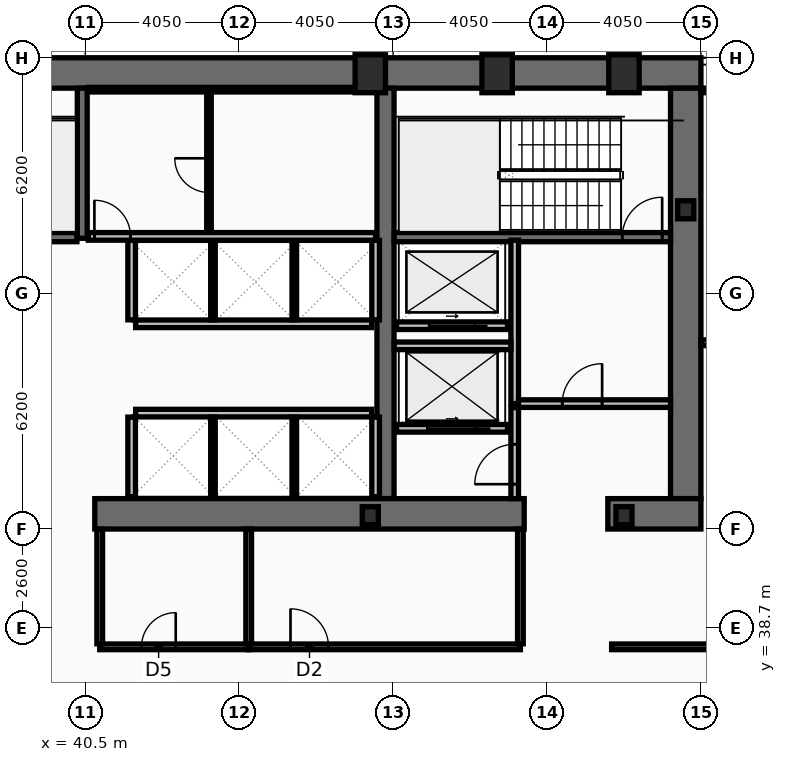
"""IFC4 building model, lengths in metres.
Left out: names, types, materials, properties, quantities, classifications, styles, units other than length and angle.
Written with IfcOpenShell. Run it as: python <this file> out.ifc"""

import sys

from ifc_helpers import new_model, si_unit, direction, frame, frame_2d, origin, origin_2d, place, context, subcontext, project, spatial, rectangle, hollow_rectangle, i_section, extrude, element, fill, save


model = new_model("IFC4")
c1 = context("Model", 3, precision=1e-05, world=origin(), true_north=direction((0.0, 1.0)))
c2 = subcontext(c1, "Body", "Model", "MODEL_VIEW")
j1 = project(units=[si_unit("LENGTHUNIT", "METRE"), si_unit("PLANEANGLEUNIT", "RADIAN")], contexts=[c1])
p1 = place(None, origin())
s1 = spatial("IfcSite", under=j1, at=p1, CompositionType="ELEMENT")
p2 = place(p1, origin())
s2 = spatial("IfcBuilding", under=s1, at=p2, CompositionType="ELEMENT")
p3 = place(p2, frame((0.0, 0.0, 73.8)))
s3 = spatial("IfcBuildingStorey", under=s2, at=p3, CompositionType="ELEMENT", Elevation=73.8)
p4 = place(p3, frame((16.2, 53.3, 0.0), z_axis=(0.0, 0.0, 1.0), x_axis=(1.0, 0.0, 0.0)))
e1 = element("IfcWall", 1, at=p4, inside=s3, PredefinedType="SHEAR", context=c2, shape_type="SweptSolid", body=[
    extrude(rectangle(XDim=40.5, YDim=0.8, at=frame_2d((20.25, 0.0))), origin(), (0.0, 0.0, 1.0), 3.82),
])
p5 = place(p3, frame((56.3, 52.9, 0.0), z_axis=(0.0, 0.0, 1.0), x_axis=(0.0, -1.0, 0.0)))
e2 = element("IfcWall", 2, at=p5, inside=s3, PredefinedType="SHEAR", context=c2, shape_type="SweptSolid", body=[
    extrude(rectangle(XDim=10.8, YDim=0.8, at=frame_2d((5.4, 0.0))), origin(), (0.0, 0.0, 1.0), 3.82),
])
p6 = place(p3, frame((48.4, 42.1, 0.0), z_axis=(0.0, 0.0, 1.0), x_axis=(0.0, 1.0, 0.0)))
e3 = element("IfcWall", 3, at=p6, inside=s3, PredefinedType="SHEAR", context=c2, shape_type="SweptSolid", body=[
    extrude(rectangle(XDim=10.8, YDim=0.45, at=frame_2d((5.4, 0.0))), origin(), (0.0, 0.0, 1.0), 3.82),
])
p7 = place(p3, frame((52.05, 41.7, 0.0), z_axis=(0.0, 0.0, 1.0), x_axis=(-1.0, 0.0, 0.0)))
e4 = element("IfcWall", 4, at=p7, inside=s3, PredefinedType="SHEAR", context=c2, shape_type="SweptSolid", body=[
    extrude(rectangle(XDim=11.3, YDim=0.8, at=frame_2d((5.65, 0.0))), origin(), (0.0, 0.0, 1.0), 3.82),
])
p8 = place(p3, frame((56.7, 41.7, 0.0), z_axis=(0.0, 0.0, 1.0), x_axis=(-1.0, 0.0, 0.0)))
e5 = element("IfcWall", 5, at=p8, inside=s3, PredefinedType="SHEAR", context=c2, shape_type="SweptSolid", body=[
    extrude(rectangle(XDim=2.45, YDim=0.8, at=frame_2d((1.225, 0.0))), origin(), (0.0, 0.0, 1.0), 3.82),
])
p9 = place(p3, frame((40.42, 48.95, 0.0), z_axis=(0.0, 0.0, 1.0), x_axis=(0.0, 1.0, 0.0)))
e6 = element("IfcWall", 6, at=p9, inside=s3, PredefinedType="SHEAR", context=c2, shape_type="SweptSolid", body=[
    extrude(rectangle(XDim=3.95, YDim=0.26, at=frame_2d((1.975, 0.0))), origin(), (0.0, 0.0, 1.0), 3.82),
])
p10 = place(p3, frame((48.63, 48.98, 0.0), z_axis=(0.0, 0.0, 1.0), x_axis=(1.0, 0.0, 0.0)))
e7 = element("IfcWall", 7, at=p10, inside=s3, PredefinedType="SHEAR", context=c2, shape_type="SweptSolid", body=[
    extrude(rectangle(XDim=7.27, YDim=0.24, at=frame_2d((3.635, 0.0))), origin(), (0.0, 0.0, 1.0), 3.82),
])
p11 = place(p10, frame((6.0, 0.0, 0.0)))
e8 = element("IfcOpeningElement", 8, at=p11, cuts=e7, PredefinedType="OPENING", context=c2, shape_type="SweptSolid", body=[
    extrude(rectangle(XDim=1.05, YDim=2.15, at=frame_2d((0.525, 1.075))), frame((0.0, 0.13, 0.0), z_axis=(0.0, -1.0, 0.0), x_axis=(1.0, 0.0, 0.0)), (0.0, 0.0, 1.0), 0.26),
])
p12 = place(p3, frame((32.72, 48.98, 0.0), z_axis=(0.0, 0.0, 1.0), x_axis=(1.0, 0.0, 0.0)))
e9 = element("IfcWall", 9, at=p12, inside=s3, PredefinedType="SHEAR", context=c2, shape_type="SweptSolid", body=[
    extrude(rectangle(XDim=7.56, YDim=0.24, at=frame_2d((3.78, 0.0))), origin(), (0.0, 0.0, 1.0), 3.82),
])
p13 = place(p12, frame((0.22, 0.0, 0.0)))
e10 = element("IfcOpeningElement", 10, at=p13, cuts=e9, PredefinedType="OPENING", context=c2, shape_type="SweptSolid", body=[
    extrude(rectangle(XDim=1.05, YDim=2.15, at=frame_2d((0.525, 1.075))), frame((0.0, 0.13, 0.0), z_axis=(0.0, -1.0, 0.0), x_axis=(1.0, 0.0, 0.0)), (0.0, 0.0, 1.0), 0.26),
])
for number, where, z_axis, x_axis in (
    (11, (48.0, 53.28, 0.0), (0.0, 0.0, 1.0), (1.0, 0.0, 0.0)),
    (12, (51.337, 53.28, 0.0), (0.0, 0.0, 1.0), (1.0, 0.0, 0.0)),
    (13, (54.675, 53.28, 0.0), (0.0, 0.0, 1.0), (1.0, 0.0, 0.0)),
):
    element("IfcColumn", number, at=place(p3, frame(where, z_axis=z_axis, x_axis=x_axis)), inside=s3, PredefinedType="COLUMN", context=c2, shape_type="SweptSolid", body=[
        extrude(hollow_rectangle(XDim=0.8, YDim=1.0, WallThickness=0.055, at=origin_2d()), origin(), (0.0, 0.0, 1.0), 4.0),
    ])
for number, where, z_axis, x_axis in (
    (14, (56.3, 49.7, 0.0), (0.0, 0.0, 1.0), (1.0, 0.0, 0.0)),
    (15, (48.0, 41.65, 0.0), (0.0, 0.0, 1.0), (1.0, 0.0, 0.0)),
    (16, (54.675, 41.65, 0.0), (0.0, 0.0, 1.0), (1.0, 0.0, 0.0)),
):
    element("IfcColumn", number, at=place(p3, frame(where, z_axis=z_axis, x_axis=x_axis)), inside=s3, PredefinedType="COLUMN", context=c2, shape_type="SweptSolid", body=[
        extrude(i_section(OverallWidth=0.424, OverallDepth=0.474, WebThickness=0.048, FlangeThickness=0.077, at=origin_2d()), origin(), (0.0, 0.0, 1.0), 4.0),
    ])
p14 = place(p3, frame((51.61, 43.95, 0.0), z_axis=(0.0, 0.0, 1.0), x_axis=(-1.0, 0.0, 0.0)))
e17 = element("IfcWall", 17, at=p14, inside=s3, PredefinedType="PARTITIONING", context=c2, shape_type="SweptSolid", body=[
    extrude(rectangle(XDim=2.92, YDim=0.2, at=frame_2d((1.46, 0.0))), origin(), (0.0, 0.0, 1.0), 3.82),
])
p15 = place(p14, frame((0.81, 0.0, 0.0)))
e18 = element("IfcOpeningElement", 18, at=p15, cuts=e17, PredefinedType="OPENING", context=c2, shape_type="SweptSolid", body=[
    extrude(rectangle(XDim=1.3, YDim=2.18, at=frame_2d((0.65, 1.09))), frame((0.0, 0.11, 0.0), z_axis=(0.0, -1.0, 0.0), x_axis=(1.0, 0.0, 0.0)), (0.0, 0.0, 1.0), 0.22),
])
p16 = place(p3, frame((51.61, 46.65, 0.0), z_axis=(0.0, 0.0, 1.0), x_axis=(-1.0, 0.0, 0.0)))
e19 = element("IfcWall", 19, at=p16, inside=s3, PredefinedType="PARTITIONING", context=c2, shape_type="SweptSolid", body=[
    extrude(rectangle(XDim=2.92, YDim=0.2, at=frame_2d((1.46, 0.0))), origin(), (0.0, 0.0, 1.0), 3.82),
])
p17 = place(p16, frame((0.86, 0.0, 0.0)))
e20 = element("IfcOpeningElement", 20, at=p17, cuts=e19, PredefinedType="OPENING", context=c2, shape_type="SweptSolid", body=[
    extrude(rectangle(XDim=1.2, YDim=2.18, at=frame_2d((0.6, 1.09))), frame((0.0, 0.11, 0.0), z_axis=(0.0, -1.0, 0.0), x_axis=(1.0, 0.0, 0.0)), (0.0, 0.0, 1.0), 0.22),
])
p18 = place(p3, frame((51.8, 44.6, 0.0), z_axis=(0.0, 0.0, 1.0), x_axis=(0.0, 1.0, 0.0)))
e21 = element("IfcWall", 21, at=p18, inside=s3, PredefinedType="PARTITIONING", context=c2, shape_type="SweptSolid", body=[
    extrude(rectangle(XDim=4.3, YDim=0.2, at=frame_2d((2.15, 0.0))), origin(), (0.0, 0.0, 1.0), 3.82),
])
p19 = place(p3, frame((51.9, 44.6, 0.0), z_axis=(0.0, 0.0, 1.0), x_axis=(1.0, 0.0, 0.0)))
e22 = element("IfcWall", 22, at=p19, inside=s3, PredefinedType="PARTITIONING", context=c2, shape_type="SweptSolid", body=[
    extrude(rectangle(XDim=4.0, YDim=0.2, at=frame_2d((2.0, 0.0))), origin(), (0.0, 0.0, 1.0), 3.82),
])
p20 = place(p19, frame((1.15, 0.0, 0.0)))
e23 = element("IfcOpeningElement", 23, at=p20, cuts=e22, PredefinedType="OPENING", context=c2, shape_type="SweptSolid", body=[
    extrude(rectangle(XDim=1.05, YDim=2.15, at=frame_2d((0.525, 1.075))), frame((0.0, 0.11, 0.0), z_axis=(0.0, -1.0, 0.0), x_axis=(1.0, 0.0, 0.0)), (0.0, 0.0, 1.0), 0.22),
])
p21 = place(p3, frame((48.63, 46.12, 0.0), z_axis=(0.0, 0.0, 1.0), x_axis=(1.0, 0.0, 0.0)))
e24 = element("IfcWall", 24, at=p21, inside=s3, PredefinedType="PARTITIONING", context=c2, shape_type="SweptSolid", body=[
    extrude(rectangle(XDim=3.07, YDim=0.2, at=frame_2d((1.535, 0.0))), origin(), (0.0, 0.0, 1.0), 3.82),
])
p22 = place(p3, frame((51.8, 42.1, 0.0), z_axis=(0.0, 0.0, 1.0), x_axis=(0.0, 1.0, 0.0)))
e25 = element("IfcWall", 25, at=p22, inside=s3, PredefinedType="PARTITIONING", context=c2, shape_type="SweptSolid", body=[
    extrude(rectangle(XDim=2.395, YDim=0.2, at=frame_2d((1.198, 0.0))), origin(), (0.0, 0.0, 1.0), 3.82),
])
p23 = place(p22, frame((0.38, 0.0, 0.0)))
e26 = element("IfcOpeningElement", 26, at=p23, cuts=e25, PredefinedType="OPENING", context=c2, shape_type="SweptSolid", body=[
    extrude(rectangle(XDim=1.05, YDim=2.15, at=frame_2d((0.525, 1.075))), frame((0.0, 0.11, 0.0), z_axis=(0.0, -1.0, 0.0), x_axis=(1.0, 0.0, 0.0)), (0.0, 0.0, 1.0), 0.22),
])
p24 = place(p3, frame((41.825, 46.7, 0.0), z_axis=(0.0, 0.0, 1.0), x_axis=(1.0, 0.0, 0.0)))
e27 = element("IfcWall", 27, at=p24, inside=s3, PredefinedType="PARTITIONING", context=c2, shape_type="SweptSolid", body=[
    extrude(rectangle(XDim=6.21, YDim=0.2, at=frame_2d((3.105, 0.0))), origin(), (0.0, 0.0, 1.0), 3.82),
])
for number, where, z_axis, x_axis in (
    (28, (41.72, 46.805, 0.0), (0.0, 0.0, 1.0), (0.0, 1.0, 0.0)),
    (29, (48.14, 46.805, 0.0), (0.0, 0.0, 1.0), (0.0, 1.0, 0.0)),
):
    element("IfcWall", number, at=place(p3, frame(where, z_axis=z_axis, x_axis=x_axis)), inside=s3, PredefinedType="PARTITIONING", context=c2, shape_type="SweptSolid", body=[
        extrude(rectangle(XDim=2.09, YDim=0.2, at=frame_2d((1.045, 0.0))), origin(), (0.0, 0.0, 1.0), 3.82),
    ])
for number, where, z_axis, x_axis in (
    (30, (43.86, 46.805, 0.0), (0.0, 0.0, 1.0), (0.0, 1.0, 0.0)),
    (31, (46.0, 46.805, 0.0), (0.0, 0.0, 1.0), (0.0, 1.0, 0.0)),
):
    element("IfcWall", number, at=place(p3, frame(where, z_axis=z_axis, x_axis=x_axis)), inside=s3, PredefinedType="PARTITIONING", context=c2, shape_type="SweptSolid", body=[
        extrude(rectangle(XDim=2.09, YDim=0.12, at=frame_2d((1.045, 0.0))), origin(), (0.0, 0.0, 1.0), 3.82),
    ])
p25 = place(p3, frame((41.825, 44.35, 0.0), z_axis=(0.0, 0.0, 1.0), x_axis=(1.0, 0.0, 0.0)))
e32 = element("IfcWall", 32, at=p25, inside=s3, PredefinedType="PARTITIONING", context=c2, shape_type="SweptSolid", body=[
    extrude(rectangle(XDim=6.21, YDim=0.2, at=frame_2d((3.105, 0.0))), origin(), (0.0, 0.0, 1.0), 3.82),
])
for number, where, z_axis, x_axis in (
    (33, (41.72, 42.15, 0.0), (0.0, 0.0, 1.0), (0.0, 1.0, 0.0)),
    (34, (48.14, 42.15, 0.0), (0.0, 0.0, 1.0), (0.0, 1.0, 0.0)),
):
    element("IfcWall", number, at=place(p3, frame(where, z_axis=z_axis, x_axis=x_axis)), inside=s3, PredefinedType="PARTITIONING", context=c2, shape_type="SweptSolid", body=[
        extrude(rectangle(XDim=2.095, YDim=0.2, at=frame_2d((1.048, 0.0))), origin(), (0.0, 0.0, 1.0), 3.82),
    ])
for number, where, z_axis, x_axis in (
    (35, (43.86, 42.15, 0.0), (0.0, 0.0, 1.0), (0.0, 1.0, 0.0)),
    (36, (46.0, 42.15, 0.0), (0.0, 0.0, 1.0), (0.0, 1.0, 0.0)),
):
    element("IfcWall", number, at=place(p3, frame(where, z_axis=z_axis, x_axis=x_axis)), inside=s3, PredefinedType="PARTITIONING", context=c2, shape_type="SweptSolid", body=[
        extrude(rectangle(XDim=2.095, YDim=0.12, at=frame_2d((1.048, 0.0))), origin(), (0.0, 0.0, 1.0), 3.82),
    ])
p26 = place(p3, frame((40.58, 52.86, 0.0), z_axis=(0.0, 0.0, 1.0), x_axis=(1.0, 0.0, 0.0)))
e37 = element("IfcWall", 37, at=p26, inside=s3, PredefinedType="PARTITIONING", context=c2, shape_type="SweptSolid", body=[
    extrude(rectangle(XDim=7.56, YDim=0.12, at=frame_2d((3.78, 0.0))), origin(), (0.0, 0.0, 1.0), 3.82),
])
p27 = place(p3, frame((40.58, 49.0, 0.0), z_axis=(0.0, 0.0, 1.0), x_axis=(1.0, 0.0, 0.0)))
e38 = element("IfcWall", 38, at=p27, inside=s3, PredefinedType="PARTITIONING", context=c2, shape_type="SweptSolid", body=[
    extrude(rectangle(XDim=7.56, YDim=0.2, at=frame_2d((3.78, 0.0))), origin(), (0.0, 0.0, 1.0), 3.82),
])
p28 = place(p27, frame((0.16, 0.0, 0.0)))
e39 = element("IfcOpeningElement", 39, at=p28, cuts=e38, PredefinedType="OPENING", context=c2, shape_type="SweptSolid", body=[
    extrude(rectangle(XDim=0.95, YDim=2.1, at=frame_2d((0.475, 1.05))), frame((0.0, 0.11, 0.0), z_axis=(0.0, -1.0, 0.0), x_axis=(1.0, 0.0, 0.0)), (0.0, 0.0, 1.0), 0.22),
])
p29 = place(p3, frame((43.755, 49.105, 0.0), z_axis=(0.0, 0.0, 1.0), x_axis=(0.0, 1.0, 0.0)))
e40 = element("IfcWall", 40, at=p29, inside=s3, PredefinedType="PARTITIONING", context=c2, shape_type="SweptSolid", body=[
    extrude(rectangle(XDim=3.69, YDim=0.12, at=frame_2d((1.845, 0.0))), origin(), (0.0, 0.0, 1.0), 3.82),
])
p30 = place(p29, frame((1.05, 0.0, 0.0)))
e41 = element("IfcOpeningElement", 41, at=p30, cuts=e40, PredefinedType="OPENING", context=c2, shape_type="SweptSolid", body=[
    extrude(rectangle(XDim=0.9, YDim=2.05, at=frame_2d((0.45, 1.025))), frame((0.0, 0.07, 0.0), z_axis=(0.0, -1.0, 0.0), x_axis=(1.0, 0.0, 0.0)), (0.0, 0.0, 1.0), 0.14),
])
p31 = place(p3, frame((40.88, 38.2, 0.0), z_axis=(0.0, 0.0, 1.0), x_axis=(1.0, 0.0, 0.0)))
e42 = element("IfcWall", 42, at=p31, inside=s3, PredefinedType="PARTITIONING", context=c2, shape_type="SweptSolid", body=[
    extrude(rectangle(XDim=3.92, YDim=0.15, at=frame_2d((1.96, 0.0))), origin(), (0.0, 0.0, 1.0), 3.01),
])
p32 = place(p31, frame((1.1, 0.0, 0.0)))
e43 = element("IfcOpeningElement", 43, at=p32, cuts=e42, PredefinedType="OPENING", context=c2, shape_type="SweptSolid", body=[
    extrude(rectangle(XDim=0.9, YDim=2.05, at=frame_2d((0.45, 1.025))), frame((0.0, 0.085, 0.0), z_axis=(0.0, -1.0, 0.0), x_axis=(1.0, 0.0, 0.0)), (0.0, 0.0, 1.0), 0.17),
])
p33 = place(p3, frame((44.8, 38.2, 0.0), z_axis=(0.0, 0.0, 1.0), x_axis=(1.0, 0.0, 0.0)))
e44 = element("IfcWall", 44, at=p33, inside=s3, PredefinedType="PARTITIONING", context=c2, shape_type="SweptSolid", body=[
    extrude(rectangle(XDim=7.15, YDim=0.15, at=frame_2d((3.575, 0.0))), origin(), (0.0, 0.0, 1.0), 3.01),
])
p34 = place(p33, frame((1.1, 0.0, 0.0)))
e45 = element("IfcOpeningElement", 45, at=p34, cuts=e44, PredefinedType="OPENING", context=c2, shape_type="SweptSolid", body=[
    extrude(rectangle(XDim=1.0, YDim=2.05, at=frame_2d((0.5, 1.025))), frame((0.0, 0.085, 0.0), z_axis=(0.0, -1.0, 0.0), x_axis=(1.0, 0.0, 0.0)), (0.0, 0.0, 1.0), 0.17),
])
for number, where, z_axis, x_axis in (
    (46, (40.88, 38.28, 0.0), (0.0, 0.0, 1.0), (0.0, 1.0, 0.0)),
    (47, (44.8, 38.28, 0.0), (0.0, 0.0, 1.0), (0.0, 1.0, 0.0)),
    (48, (51.95, 38.28, 0.0), (0.0, 0.0, 1.0), (0.0, 1.0, 0.0)),
):
    element("IfcWall", number, at=place(p3, frame(where, z_axis=z_axis, x_axis=x_axis)), inside=s3, PredefinedType="PARTITIONING", context=c2, shape_type="SweptSolid", body=[
        extrude(rectangle(XDim=3.02, YDim=0.15, at=frame_2d((1.51, 0.0))), origin(), (0.0, 0.0, 1.0), 3.82),
    ])
p35 = place(p3, frame((54.35, 38.2, 0.0), z_axis=(0.0, 0.0, 1.0), x_axis=(1.0, 0.0, 0.0)))
e49 = element("IfcWall", 49, at=p35, inside=s3, PredefinedType="PARTITIONING", context=c2, shape_type="SweptSolid", body=[
    extrude(rectangle(XDim=16.52, YDim=0.15, at=frame_2d((8.26, 0.0))), origin(), (0.0, 0.0, 1.0), 3.01),
])
p36 = place(p35, frame((3.25, 0.0, 0.0)))
e50 = element("IfcOpeningElement", 50, at=p36, cuts=e49, PredefinedType="OPENING", context=c2, shape_type="SweptSolid", body=[
    extrude(rectangle(XDim=0.95, YDim=2.05, at=frame_2d((0.475, 1.025))), frame((0.0, 0.085, 0.0), z_axis=(0.0, -1.0, 0.0), x_axis=(1.0, 0.0, 0.0)), (0.0, 0.0, 1.0), 0.17),
])
p37 = place(p3, frame((56.7, 46.2, 0.0), z_axis=(0.0, 0.0, 1.0), x_axis=(1.0, 0.0, 0.0)))
e51 = element("IfcWall", 51, at=p37, inside=s3, PredefinedType="PARTITIONING", context=c2, shape_type="SweptSolid", body=[
    extrude(rectangle(XDim=14.105, YDim=0.15, at=frame_2d((7.052, 0.0))), origin(), (0.0, 0.0, 1.0), 3.16),
])
p38 = place(p37, frame((0.9, 0.0, 0.0)))
e52 = element("IfcOpeningElement", 52, at=p38, cuts=e51, PredefinedType="OPENING", context=c2, shape_type="SweptSolid", body=[
    extrude(rectangle(XDim=0.9, YDim=2.05, at=frame_2d((0.45, 1.025))), frame((0.0, 0.085, 0.0), z_axis=(0.0, -1.0, 0.0), x_axis=(1.0, 0.0, 0.0)), (0.0, 0.0, 1.0), 0.17),
])
p39 = place(p3, frame((56.7, 52.84, 0.0), z_axis=(0.0, 0.0, 1.0), x_axis=(1.0, 0.0, 0.0)))
e53 = element("IfcWall", 53, at=p39, inside=s3, PredefinedType="PARTITIONING", context=c2, shape_type="SweptSolid", body=[
    extrude(rectangle(XDim=14.105, YDim=0.12, at=frame_2d((7.052, 0.0))), origin(), (0.0, 0.0, 1.0), 3.82),
])
p40 = place(p11, origin())
e54 = element("IfcDoor", 54, at=p40, inside=s3, OperationType="SINGLE_SWING_RIGHT", PredefinedType="DOOR", context=c2, shape_type="SweptSolid", body=[
    extrude(rectangle(XDim=1.05, YDim=2.15, at=frame_2d((0.525, 1.075))), frame((0.0, 0.025, 0.0), z_axis=(0.0, -1.0, 0.0), x_axis=(1.0, 0.0, 0.0)), (0.0, 0.0, 1.0), 0.05),
])
fill(e8, e54)
p41 = place(p15, origin())
e55 = element("IfcDoor", 55, at=p41, inside=s3, OperationType="SLIDING_TO_LEFT", PredefinedType="DOOR", context=c2, shape_type="SweptSolid", body=[
    extrude(rectangle(XDim=1.3, YDim=2.18, at=frame_2d((0.65, 1.09))), frame((0.0, 0.025, 0.0), z_axis=(0.0, -1.0, 0.0), x_axis=(1.0, 0.0, 0.0)), (0.0, 0.0, 1.0), 0.05),
])
fill(e18, e55)
p42 = place(p17, origin())
e56 = element("IfcDoor", 56, at=p42, inside=s3, OperationType="SLIDING_TO_LEFT", PredefinedType="DOOR", context=c2, shape_type="SweptSolid", body=[
    extrude(rectangle(XDim=1.2, YDim=2.18, at=frame_2d((0.6, 1.09))), frame((0.0, 0.025, 0.0), z_axis=(0.0, -1.0, 0.0), x_axis=(1.0, 0.0, 0.0)), (0.0, 0.0, 1.0), 0.05),
])
fill(e20, e56)
p43 = place(p20, origin())
e57 = element("IfcDoor", 57, at=p43, inside=s3, OperationType="SINGLE_SWING_RIGHT", PredefinedType="DOOR", context=c2, shape_type="SweptSolid", body=[
    extrude(rectangle(XDim=1.05, YDim=2.15, at=frame_2d((0.525, 1.075))), frame((0.0, 0.025, 0.0), z_axis=(0.0, -1.0, 0.0), x_axis=(1.0, 0.0, 0.0)), (0.0, 0.0, 1.0), 0.05),
])
fill(e23, e57)
p44 = place(p23, origin())
e58 = element("IfcDoor", 58, at=p44, inside=s3, OperationType="SINGLE_SWING_LEFT", PredefinedType="DOOR", context=c2, shape_type="SweptSolid", body=[
    extrude(rectangle(XDim=1.05, YDim=2.15, at=frame_2d((0.525, 1.075))), frame((0.0, 0.025, 0.0), z_axis=(0.0, -1.0, 0.0), x_axis=(1.0, 0.0, 0.0)), (0.0, 0.0, 1.0), 0.05),
])
fill(e26, e58)
p45 = place(p28, origin())
e59 = element("IfcDoor", 59, at=p45, inside=s3, OperationType="SINGLE_SWING_LEFT", PredefinedType="DOOR", context=c2, shape_type="SweptSolid", body=[
    extrude(rectangle(XDim=0.95, YDim=2.1, at=frame_2d((0.475, 1.05))), frame((0.0, 0.025, 0.0), z_axis=(0.0, -1.0, 0.0), x_axis=(1.0, 0.0, 0.0)), (0.0, 0.0, 1.0), 0.05),
])
fill(e39, e59)
p46 = place(p30, origin())
e60 = element("IfcDoor", 60, at=p46, inside=s3, OperationType="SINGLE_SWING_RIGHT", PredefinedType="DOOR", context=c2, shape_type="SweptSolid", body=[
    extrude(rectangle(XDim=0.9, YDim=2.05, at=frame_2d((0.45, 1.025))), frame((0.0, 0.025, 0.0), z_axis=(0.0, -1.0, 0.0), x_axis=(1.0, 0.0, 0.0)), (0.0, 0.0, 1.0), 0.05),
])
fill(e41, e60)
p47 = place(p32, origin())
e61 = element("IfcDoor", 61, at=p47, inside=s3, OperationType="SINGLE_SWING_RIGHT", PredefinedType="DOOR", context=c2, shape_type="SweptSolid", body=[
    extrude(rectangle(XDim=0.9, YDim=2.05, at=frame_2d((0.45, 1.025))), frame((0.0, 0.025, 0.0), z_axis=(0.0, -1.0, 0.0), x_axis=(1.0, 0.0, 0.0)), (0.0, 0.0, 1.0), 0.05),
])
fill(e43, e61)
p48 = place(p34, origin())
e62 = element("IfcDoor", 62, at=p48, inside=s3, OperationType="SINGLE_SWING_LEFT", PredefinedType="DOOR", context=c2, shape_type="SweptSolid", body=[
    extrude(rectangle(XDim=1.0, YDim=2.05, at=frame_2d((0.5, 1.025))), frame((0.0, 0.025, 0.0), z_axis=(0.0, -1.0, 0.0), x_axis=(1.0, 0.0, 0.0)), (0.0, 0.0, 1.0), 0.05),
])
fill(e45, e62)
save(model, sys.argv[1])
